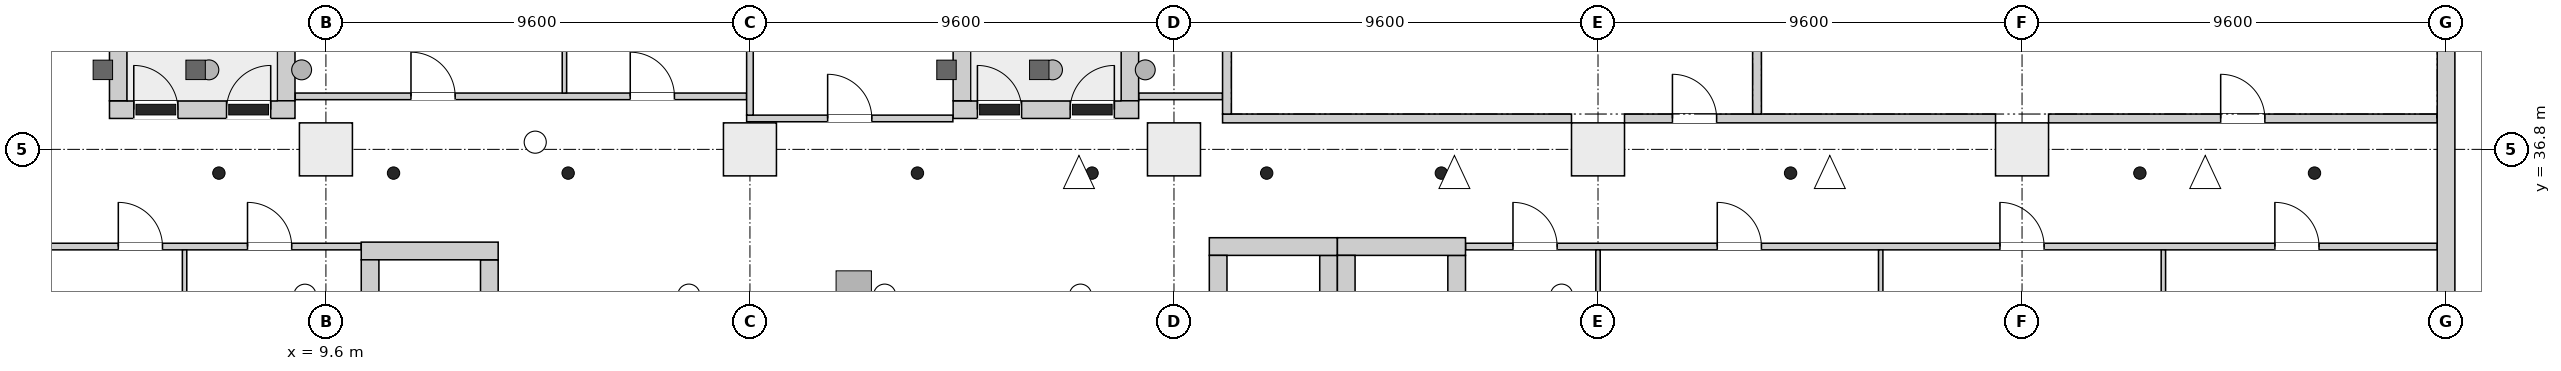
"""IFC4 building model, lengths in metres.
Left out: names, types, materials, properties, quantities, classifications, styles, units other than length and angle.
Written with IfcOpenShell. Run it as: python <this file> out.ifc"""

import sys

from ifc_helpers import new_model, si_unit, direction, frame, frame_2d, origin, origin_2d, place, context, subcontext, project, spatial, rectangle, extrude, element, fill, save


model = new_model("IFC4")
c1 = context("Model", 3, precision=1e-05, world=origin(), true_north=direction((0.0, 1.0)))
c2 = subcontext(c1, "Body", "Model", "MODEL_VIEW")
j1 = project(units=[si_unit("LENGTHUNIT", "METRE"), si_unit("PLANEANGLEUNIT", "RADIAN")], contexts=[c1])
p1 = place(None, origin())
s1 = spatial("IfcSite", under=j1, at=p1, CompositionType="ELEMENT")
p2 = place(p1, origin())
s2 = spatial("IfcBuilding", under=s1, at=p2, CompositionType="ELEMENT")
p3 = place(p2, frame((0.0, 0.0, 21.7)))
s3 = spatial("IfcBuildingStorey", under=s2, at=p3, CompositionType="ELEMENT", Elevation=21.7)
p4 = place(p3, frame((57.6, -0.2, 0.0), z_axis=(0.0, 0.0, 1.0), x_axis=(0.0, 1.0, 0.0)))
e1 = element("IfcWall", 1, at=p4, inside=s3, PredefinedType="SHEAR", context=c2, shape_type="SweptSolid", body=[
    extrude(rectangle(XDim=46.88, YDim=0.4, at=frame_2d((23.44, 0.0))), origin(), (0.0, 0.0, 1.0), 5.0),
])
p5 = place(p3, frame((4.7, 37.7, 0.0), z_axis=(0.0, 0.0, 1.0), x_axis=(1.0, 0.0, 0.0)))
e2 = element("IfcWall", 2, at=p5, inside=s3, PredefinedType="SHEAR", context=c2, shape_type="SweptSolid", body=[
    extrude(rectangle(XDim=4.2, YDim=0.4, at=frame_2d((2.1, 0.0))), origin(), (0.0, 0.0, 1.0), 5.0),
])
p6 = place(p5, frame((0.55, 0.0, 0.0)))
e3 = element("IfcOpeningElement", 3, at=p6, cuts=e2, PredefinedType="OPENING", context=c2, shape_type="SweptSolid", body=[
    extrude(rectangle(XDim=1.0, YDim=2.1, at=frame_2d((0.5, 1.05))), frame((0.0, 0.21, 0.0), z_axis=(0.0, -1.0, 0.0), x_axis=(1.0, 0.0, 0.0)), (0.0, 0.0, 1.0), 0.42),
])
p7 = place(p5, frame((2.65, 0.0, 0.0)))
e4 = element("IfcOpeningElement", 4, at=p7, cuts=e2, PredefinedType="OPENING", context=c2, shape_type="SweptSolid", body=[
    extrude(rectangle(XDim=1.0, YDim=2.1, at=frame_2d((0.5, 1.05))), frame((0.0, 0.21, 0.0), z_axis=(0.0, -1.0, 0.0), x_axis=(1.0, 0.0, 0.0)), (0.0, 0.0, 1.0), 0.42),
])
for number, where, z_axis, x_axis in (
    (5, (4.9, 37.9, 0.0), (0.0, 0.0, 1.0), (0.0, 1.0, 0.0)),
    (6, (8.7, 37.9, 0.0), (0.0, 0.0, 1.0), (0.0, 1.0, 0.0)),
):
    element("IfcWall", number, at=place(p3, frame(where, z_axis=z_axis, x_axis=x_axis)), inside=s3, PredefinedType="SHEAR", context=c2, shape_type="SweptSolid", body=[
        extrude(rectangle(XDim=6.6, YDim=0.4, at=frame_2d((3.3, 0.0))), origin(), (0.0, 0.0, 1.0), 5.0),
    ])
p8 = place(p3, frame((23.8, 37.7, 0.0), z_axis=(0.0, 0.0, 1.0), x_axis=(1.0, 0.0, 0.0)))
e7 = element("IfcWall", 7, at=p8, inside=s3, PredefinedType="SHEAR", context=c2, shape_type="SweptSolid", body=[
    extrude(rectangle(XDim=4.2, YDim=0.4, at=frame_2d((2.1, 0.0))), origin(), (0.0, 0.0, 1.0), 5.0),
])
p9 = place(p8, frame((0.55, 0.0, 0.0)))
e8 = element("IfcOpeningElement", 8, at=p9, cuts=e7, PredefinedType="OPENING", context=c2, shape_type="SweptSolid", body=[
    extrude(rectangle(XDim=1.0, YDim=2.1, at=frame_2d((0.5, 1.05))), frame((0.0, 0.21, 0.0), z_axis=(0.0, -1.0, 0.0), x_axis=(1.0, 0.0, 0.0)), (0.0, 0.0, 1.0), 0.42),
])
p10 = place(p8, frame((2.65, 0.0, 0.0)))
e9 = element("IfcOpeningElement", 9, at=p10, cuts=e7, PredefinedType="OPENING", context=c2, shape_type="SweptSolid", body=[
    extrude(rectangle(XDim=1.0, YDim=2.1, at=frame_2d((0.5, 1.05))), frame((0.0, 0.21, 0.0), z_axis=(0.0, -1.0, 0.0), x_axis=(1.0, 0.0, 0.0)), (0.0, 0.0, 1.0), 0.42),
])
for number, where, z_axis, x_axis in (
    (10, (24.0, 37.9, 0.0), (0.0, 0.0, 1.0), (0.0, 1.0, 0.0)),
    (11, (27.8, 37.9, 0.0), (0.0, 0.0, 1.0), (0.0, 1.0, 0.0)),
):
    element("IfcWall", number, at=place(p3, frame(where, z_axis=z_axis, x_axis=x_axis)), inside=s3, PredefinedType="SHEAR", context=c2, shape_type="SweptSolid", body=[
        extrude(rectangle(XDim=6.6, YDim=0.4, at=frame_2d((3.3, 0.0))), origin(), (0.0, 0.0, 1.0), 5.0),
    ])
p11 = place(p3, frame((10.4, 34.5, 0.0), z_axis=(0.0, 0.0, 1.0), x_axis=(1.0, 0.0, 0.0)))
e12 = element("IfcWall", 12, at=p11, inside=s3, PredefinedType="SHEAR", context=c2, shape_type="SweptSolid", body=[
    extrude(rectangle(XDim=3.1, YDim=0.4, at=frame_2d((1.55, 0.0))), origin(), (0.0, 0.0, 1.0), 5.0),
])
for number, where, z_axis, x_axis in (
    (13, (10.6, 30.9, 0.0), (0.0, 0.0, 1.0), (0.0, 1.0, 0.0)),
    (14, (13.3, 30.9, 0.0), (0.0, 0.0, 1.0), (0.0, 1.0, 0.0)),
):
    element("IfcWall", number, at=place(p3, frame(where, z_axis=z_axis, x_axis=x_axis)), inside=s3, PredefinedType="SHEAR", context=c2, shape_type="SweptSolid", body=[
        extrude(rectangle(XDim=3.4, YDim=0.4, at=frame_2d((1.7, 0.0))), origin(), (0.0, 0.0, 1.0), 5.0),
    ])
p12 = place(p3, frame((29.6, 34.6, 0.0), z_axis=(0.0, 0.0, 1.0), x_axis=(1.0, 0.0, 0.0)))
e15 = element("IfcWall", 15, at=p12, inside=s3, PredefinedType="SHEAR", context=c2, shape_type="SweptSolid", body=[
    extrude(rectangle(XDim=2.9, YDim=0.4, at=frame_2d((1.45, 0.0))), origin(), (0.0, 0.0, 1.0), 5.0),
])
for number, where, z_axis, x_axis in (
    (16, (29.8, 31.4, 0.0), (0.0, 0.0, 1.0), (0.0, 1.0, 0.0)),
    (17, (32.3, 31.4, 0.0), (0.0, 0.0, 1.0), (0.0, 1.0, 0.0)),
):
    element("IfcWall", number, at=place(p3, frame(where, z_axis=z_axis, x_axis=x_axis)), inside=s3, PredefinedType="SHEAR", context=c2, shape_type="SweptSolid", body=[
        extrude(rectangle(XDim=3.0, YDim=0.4, at=frame_2d((1.5, 0.0))), origin(), (0.0, 0.0, 1.0), 5.0),
    ])
p13 = place(p3, frame((32.5, 34.6, 0.0), z_axis=(0.0, 0.0, 1.0), x_axis=(1.0, 0.0, 0.0)))
e18 = element("IfcWall", 18, at=p13, inside=s3, PredefinedType="SHEAR", context=c2, shape_type="SweptSolid", body=[
    extrude(rectangle(XDim=2.9, YDim=0.4, at=frame_2d((1.45, 0.0))), origin(), (0.0, 0.0, 1.0), 5.0),
])
for number, where, z_axis, x_axis in (
    (19, (32.7, 31.4, 0.0), (0.0, 0.0, 1.0), (0.0, 1.0, 0.0)),
    (20, (35.2, 31.4, 0.0), (0.0, 0.0, 1.0), (0.0, 1.0, 0.0)),
):
    element("IfcWall", number, at=place(p3, frame(where, z_axis=z_axis, x_axis=x_axis)), inside=s3, PredefinedType="SHEAR", context=c2, shape_type="SweptSolid", body=[
        extrude(rectangle(XDim=3.0, YDim=0.4, at=frame_2d((1.5, 0.0))), origin(), (0.0, 0.0, 1.0), 5.0),
    ])
for number, where, z_axis, x_axis in (
    (21, (9.6, 36.8, 0.0), (0.0, 0.0, 1.0), (1.0, 0.0, 0.0)),
    (22, (19.2, 36.8, 0.0), (0.0, 0.0, 1.0), (1.0, 0.0, 0.0)),
    (23, (28.8, 36.8, 0.0), (0.0, 0.0, 1.0), (1.0, 0.0, 0.0)),
    (24, (38.4, 36.8, 0.0), (0.0, 0.0, 1.0), (1.0, 0.0, 0.0)),
    (25, (48.0, 36.8, 0.0), (0.0, 0.0, 1.0), (1.0, 0.0, 0.0)),
):
    element("IfcColumn", number, at=place(p3, frame(where, z_axis=z_axis, x_axis=x_axis)), inside=s3, PredefinedType="COLUMN", context=c2, shape_type="SweptSolid", body=[
        extrude(rectangle(XDim=1.2, YDim=1.2, at=origin_2d()), origin(), (0.0, 0.0, 1.0), 5.0),
    ])
p14 = place(p3, frame((2.706, 34.6, 0.0), z_axis=(0.0, 0.0, 1.0), x_axis=(1.0, 0.0, 0.0)))
e26 = element("IfcWall", 26, at=p14, inside=s3, PredefinedType="PARTITIONING", context=c2, shape_type="SweptSolid", body=[
    extrude(rectangle(XDim=7.688, YDim=0.15, at=frame_2d((3.844, 0.0))), origin(), (0.0, 0.0, 1.0), 4.65),
])
p15 = place(p14, frame((2.194, 0.0, 0.0)))
e27 = element("IfcOpeningElement", 27, at=p15, cuts=e26, PredefinedType="OPENING", context=c2, shape_type="SweptSolid", body=[
    extrude(rectangle(XDim=1.0, YDim=2.1, at=frame_2d((0.5, 1.05))), frame((0.0, 0.085, 0.0), z_axis=(0.0, -1.0, 0.0), x_axis=(1.0, 0.0, 0.0)), (0.0, 0.0, 1.0), 0.17),
])
p16 = place(p14, frame((5.119, 0.0, 0.0)))
e28 = element("IfcOpeningElement", 28, at=p16, cuts=e26, PredefinedType="OPENING", context=c2, shape_type="SweptSolid", body=[
    extrude(rectangle(XDim=1.0, YDim=2.1, at=frame_2d((0.5, 1.05))), frame((0.0, 0.085, 0.0), z_axis=(0.0, -1.0, 0.0), x_axis=(1.0, 0.0, 0.0)), (0.0, 0.0, 1.0), 0.17),
])
p17 = place(p3, frame((6.4, 24.875, 0.0), z_axis=(0.0, 0.0, 1.0), x_axis=(0.0, 1.0, 0.0)))
e29 = element("IfcWall", 29, at=p17, inside=s3, PredefinedType="PARTITIONING", context=c2, shape_type="SweptSolid", body=[
    extrude(rectangle(XDim=9.65, YDim=0.1, at=frame_2d((4.825, 0.0))), origin(), (0.0, 0.0, 1.0), 4.65),
])
p18 = place(p3, frame((8.906, 38.0, 0.0), z_axis=(0.0, 0.0, 1.0), x_axis=(1.0, 0.0, 0.0)))
e30 = element("IfcWall", 30, at=p18, inside=s3, PredefinedType="PARTITIONING", context=c2, shape_type="SweptSolid", body=[
    extrude(rectangle(XDim=10.219, YDim=0.15, at=frame_2d((5.109, 0.0))), origin(), (0.0, 0.0, 1.0), 4.65),
])
p19 = place(p18, frame((2.62, 0.0, 0.0)))
e31 = element("IfcOpeningElement", 31, at=p19, cuts=e30, PredefinedType="OPENING", context=c2, shape_type="SweptSolid", body=[
    extrude(rectangle(XDim=1.0, YDim=2.1, at=frame_2d((0.5, 1.05))), frame((0.0, 0.085, 0.0), z_axis=(0.0, -1.0, 0.0), x_axis=(1.0, 0.0, 0.0)), (0.0, 0.0, 1.0), 0.17),
])
p20 = place(p18, frame((7.584, 0.0, 0.0)))
e32 = element("IfcOpeningElement", 32, at=p20, cuts=e30, PredefinedType="OPENING", context=c2, shape_type="SweptSolid", body=[
    extrude(rectangle(XDim=1.0, YDim=2.1, at=frame_2d((0.5, 1.05))), frame((0.0, 0.085, 0.0), z_axis=(0.0, -1.0, 0.0), x_axis=(1.0, 0.0, 0.0)), (0.0, 0.0, 1.0), 0.17),
])
p21 = place(p3, frame((15.0, 38.075, 0.0), z_axis=(0.0, 0.0, 1.0), x_axis=(0.0, 1.0, 0.0)))
e33 = element("IfcWall", 33, at=p21, inside=s3, PredefinedType="PARTITIONING", context=c2, shape_type="SweptSolid", body=[
    extrude(rectangle(XDim=5.65, YDim=0.1, at=frame_2d((2.825, 0.0))), origin(), (0.0, 0.0, 1.0), 4.65),
])
p22 = place(p3, frame((19.125, 37.5, 0.0), z_axis=(0.0, 0.0, 1.0), x_axis=(1.0, 0.0, 0.0)))
e34 = element("IfcWall", 34, at=p22, inside=s3, PredefinedType="PARTITIONING", context=c2, shape_type="SweptSolid", body=[
    extrude(rectangle(XDim=4.669, YDim=0.15, at=frame_2d((2.334, 0.0))), origin(), (0.0, 0.0, 1.0), 4.65),
])
p23 = place(p22, frame((1.834, 0.0, 0.0)))
e35 = element("IfcOpeningElement", 35, at=p23, cuts=e34, PredefinedType="OPENING", context=c2, shape_type="SweptSolid", body=[
    extrude(rectangle(XDim=1.0, YDim=2.1, at=frame_2d((0.5, 1.05))), frame((0.0, 0.085, 0.0), z_axis=(0.0, -1.0, 0.0), x_axis=(1.0, 0.0, 0.0)), (0.0, 0.0, 1.0), 0.17),
])
p24 = place(p3, frame((19.2, 37.575, 0.0), z_axis=(0.0, 0.0, 1.0), x_axis=(0.0, 1.0, 0.0)))
e36 = element("IfcWall", 36, at=p24, inside=s3, PredefinedType="PARTITIONING", context=c2, shape_type="SweptSolid", body=[
    extrude(rectangle(XDim=6.15, YDim=0.15, at=frame_2d((3.075, 0.0))), origin(), (0.0, 0.0, 1.0), 4.25),
])
p25 = place(p3, frame((28.006, 38.0, 0.0), z_axis=(0.0, 0.0, 1.0), x_axis=(1.0, 0.0, 0.0)))
e37 = element("IfcWall", 37, at=p25, inside=s3, PredefinedType="PARTITIONING", context=c2, shape_type="SweptSolid", body=[
    extrude(rectangle(XDim=1.894, YDim=0.15, at=frame_2d((0.947, 0.0))), origin(), (0.0, 0.0, 1.0), 4.65),
])
p26 = place(p3, frame((29.9, 37.5, 0.0), z_axis=(0.0, 0.0, 1.0), x_axis=(1.0, 0.0, 0.0)))
e38 = element("IfcWall", 38, at=p26, inside=s3, PredefinedType="PARTITIONING", context=c2, shape_type="SweptSolid", body=[
    extrude(rectangle(XDim=7.9, YDim=0.2, at=frame_2d((3.95, 0.0))), origin(), (0.0, 0.0, 1.0), 4.65),
])
p27 = place(p3, frame((30.0, 37.6, 0.0), z_axis=(0.0, 0.0, 1.0), x_axis=(0.0, 1.0, 0.0)))
e39 = element("IfcWall", 39, at=p27, inside=s3, PredefinedType="PARTITIONING", context=c2, shape_type="SweptSolid", body=[
    extrude(rectangle(XDim=6.1, YDim=0.2, at=frame_2d((3.05, 0.0))), origin(), (0.0, 0.0, 1.0), 4.65),
])
p28 = place(p3, frame((35.406, 34.6, 0.0), z_axis=(0.0, 0.0, 1.0), x_axis=(1.0, 0.0, 0.0)))
e40 = element("IfcWall", 40, at=p28, inside=s3, PredefinedType="PARTITIONING", context=c2, shape_type="SweptSolid", body=[
    extrude(rectangle(XDim=21.988, YDim=0.15, at=frame_2d((10.994, 0.0))), origin(), (0.0, 0.0, 1.0), 4.65),
])
p29 = place(p28, frame((1.069, 0.0, 0.0)))
e41 = element("IfcOpeningElement", 41, at=p29, cuts=e40, PredefinedType="OPENING", context=c2, shape_type="SweptSolid", body=[
    extrude(rectangle(XDim=1.0, YDim=2.1, at=frame_2d((0.5, 1.05))), frame((0.0, 0.085, 0.0), z_axis=(0.0, -1.0, 0.0), x_axis=(1.0, 0.0, 0.0)), (0.0, 0.0, 1.0), 0.17),
])
p30 = place(p28, frame((5.694, 0.0, 0.0)))
e42 = element("IfcOpeningElement", 42, at=p30, cuts=e40, PredefinedType="OPENING", context=c2, shape_type="SweptSolid", body=[
    extrude(rectangle(XDim=1.0, YDim=2.1, at=frame_2d((0.5, 1.05))), frame((0.0, 0.085, 0.0), z_axis=(0.0, -1.0, 0.0), x_axis=(1.0, 0.0, 0.0)), (0.0, 0.0, 1.0), 0.17),
])
p31 = place(p28, frame((12.094, 0.0, 0.0)))
e43 = element("IfcOpeningElement", 43, at=p31, cuts=e40, PredefinedType="OPENING", context=c2, shape_type="SweptSolid", body=[
    extrude(rectangle(XDim=1.0, YDim=2.1, at=frame_2d((0.5, 1.05))), frame((0.0, 0.085, 0.0), z_axis=(0.0, -1.0, 0.0), x_axis=(1.0, 0.0, 0.0)), (0.0, 0.0, 1.0), 0.17),
])
p32 = place(p28, frame((18.318, 0.0, 0.0)))
e44 = element("IfcOpeningElement", 44, at=p32, cuts=e40, PredefinedType="OPENING", context=c2, shape_type="SweptSolid", body=[
    extrude(rectangle(XDim=1.0, YDim=2.1, at=frame_2d((0.5, 1.05))), frame((0.0, 0.085, 0.0), z_axis=(0.0, -1.0, 0.0), x_axis=(1.0, 0.0, 0.0)), (0.0, 0.0, 1.0), 0.17),
])
p33 = place(p3, frame((38.4, 28.2, 0.0), z_axis=(0.0, 0.0, 1.0), x_axis=(0.0, 1.0, 0.0)))
e45 = element("IfcWall", 45, at=p33, inside=s3, PredefinedType="PARTITIONING", context=c2, shape_type="SweptSolid", body=[
    extrude(rectangle(XDim=6.325, YDim=0.1, at=frame_2d((3.163, 0.0))), origin(), (0.0, 0.0, 1.0), 4.25),
])
p34 = place(p3, frame((39.0, 37.5, 0.0), z_axis=(0.0, 0.0, 1.0), x_axis=(1.0, 0.0, 0.0)))
e46 = element("IfcWall", 46, at=p34, inside=s3, PredefinedType="PARTITIONING", context=c2, shape_type="SweptSolid", body=[
    extrude(rectangle(XDim=8.4, YDim=0.2, at=frame_2d((4.2, 0.0))), origin(), (0.0, 0.0, 1.0), 4.65),
])
p35 = place(p34, frame((1.085, 0.0, 0.0)))
e47 = element("IfcOpeningElement", 47, at=p35, cuts=e46, PredefinedType="OPENING", context=c2, shape_type="SweptSolid", body=[
    extrude(rectangle(XDim=1.0, YDim=2.1, at=frame_2d((0.5, 1.05))), frame((0.0, 0.11, 0.0), z_axis=(0.0, -1.0, 0.0), x_axis=(1.0, 0.0, 0.0)), (0.0, 0.0, 1.0), 0.22),
])
p36 = place(p3, frame((42.0, 37.6, 0.0), z_axis=(0.0, 0.0, 1.0), x_axis=(0.0, 1.0, 0.0)))
e48 = element("IfcWall", 48, at=p36, inside=s3, PredefinedType="PARTITIONING", context=c2, shape_type="SweptSolid", body=[
    extrude(rectangle(XDim=6.1, YDim=0.2, at=frame_2d((3.05, 0.0))), origin(), (0.0, 0.0, 1.0), 4.65),
])
p37 = place(p3, frame((44.8, 27.05, 0.0), z_axis=(0.0, 0.0, 1.0), x_axis=(0.0, 1.0, 0.0)))
e49 = element("IfcWall", 49, at=p37, inside=s3, PredefinedType="PARTITIONING", context=c2, shape_type="SweptSolid", body=[
    extrude(rectangle(XDim=7.475, YDim=0.1, at=frame_2d((3.737, 0.0))), origin(), (0.0, 0.0, 1.0), 4.65),
])
p38 = place(p3, frame((48.6, 37.5, 0.0), z_axis=(0.0, 0.0, 1.0), x_axis=(1.0, 0.0, 0.0)))
e50 = element("IfcWall", 50, at=p38, inside=s3, PredefinedType="PARTITIONING", context=c2, shape_type="SweptSolid", body=[
    extrude(rectangle(XDim=8.794, YDim=0.2, at=frame_2d((4.397, 0.0))), origin(), (0.0, 0.0, 1.0), 4.65),
])
p39 = place(p38, frame((3.897, 0.0, 0.0)))
e51 = element("IfcOpeningElement", 51, at=p39, cuts=e50, PredefinedType="OPENING", context=c2, shape_type="SweptSolid", body=[
    extrude(rectangle(XDim=1.0, YDim=2.1, at=frame_2d((0.5, 1.05))), frame((0.0, 0.11, 0.0), z_axis=(0.0, -1.0, 0.0), x_axis=(1.0, 0.0, 0.0)), (0.0, 0.0, 1.0), 0.22),
])
p40 = place(p3, frame((51.2, 27.05, 0.0), z_axis=(0.0, 0.0, 1.0), x_axis=(0.0, 1.0, 0.0)))
e52 = element("IfcWall", 52, at=p40, inside=s3, PredefinedType="PARTITIONING", context=c2, shape_type="SweptSolid", body=[
    extrude(rectangle(XDim=7.475, YDim=0.1, at=frame_2d((3.737, 0.0))), origin(), (0.0, 0.0, 1.0), 4.65),
])
p41 = place(p6, origin())
e53 = element("IfcDoor", 53, at=p41, inside=s3, OperationType="SINGLE_SWING_RIGHT", PredefinedType="DOOR", context=c2, shape_type="SweptSolid", body=[
    extrude(rectangle(XDim=1.0, YDim=2.1, at=frame_2d((0.5, 1.05))), frame((0.0, 0.025, 0.0), z_axis=(0.0, -1.0, 0.0), x_axis=(1.0, 0.0, 0.0)), (0.0, 0.0, 1.0), 0.05),
])
fill(e3, e53)
p42 = place(p7, origin())
e54 = element("IfcDoor", 54, at=p42, inside=s3, OperationType="SINGLE_SWING_LEFT", PredefinedType="DOOR", context=c2, shape_type="SweptSolid", body=[
    extrude(rectangle(XDim=1.0, YDim=2.1, at=frame_2d((0.5, 1.05))), frame((0.0, 0.025, 0.0), z_axis=(0.0, -1.0, 0.0), x_axis=(1.0, 0.0, 0.0)), (0.0, 0.0, 1.0), 0.05),
])
fill(e4, e54)
p43 = place(p9, origin())
e55 = element("IfcDoor", 55, at=p43, inside=s3, OperationType="SINGLE_SWING_RIGHT", PredefinedType="DOOR", context=c2, shape_type="SweptSolid", body=[
    extrude(rectangle(XDim=1.0, YDim=2.1, at=frame_2d((0.5, 1.05))), frame((0.0, 0.025, 0.0), z_axis=(0.0, -1.0, 0.0), x_axis=(1.0, 0.0, 0.0)), (0.0, 0.0, 1.0), 0.05),
])
fill(e8, e55)
p44 = place(p10, origin())
e56 = element("IfcDoor", 56, at=p44, inside=s3, OperationType="SINGLE_SWING_LEFT", PredefinedType="DOOR", context=c2, shape_type="SweptSolid", body=[
    extrude(rectangle(XDim=1.0, YDim=2.1, at=frame_2d((0.5, 1.05))), frame((0.0, 0.025, 0.0), z_axis=(0.0, -1.0, 0.0), x_axis=(1.0, 0.0, 0.0)), (0.0, 0.0, 1.0), 0.05),
])
fill(e9, e56)
p45 = place(p15, origin())
e57 = element("IfcDoor", 57, at=p45, inside=s3, OperationType="SINGLE_SWING_RIGHT", PredefinedType="DOOR", context=c2, shape_type="SweptSolid", body=[
    extrude(rectangle(XDim=1.0, YDim=2.1, at=frame_2d((0.5, 1.05))), frame((0.0, 0.025, 0.0), z_axis=(0.0, -1.0, 0.0), x_axis=(1.0, 0.0, 0.0)), (0.0, 0.0, 1.0), 0.05),
])
fill(e27, e57)
p46 = place(p16, origin())
e58 = element("IfcDoor", 58, at=p46, inside=s3, OperationType="SINGLE_SWING_LEFT", PredefinedType="DOOR", context=c2, shape_type="SweptSolid", body=[
    extrude(rectangle(XDim=1.0, YDim=2.1, at=frame_2d((0.5, 1.05))), frame((0.0, 0.025, 0.0), z_axis=(0.0, -1.0, 0.0), x_axis=(1.0, 0.0, 0.0)), (0.0, 0.0, 1.0), 0.05),
])
fill(e28, e58)
p47 = place(p29, origin())
e59 = element("IfcDoor", 59, at=p47, inside=s3, OperationType="SINGLE_SWING_RIGHT", PredefinedType="DOOR", context=c2, shape_type="SweptSolid", body=[
    extrude(rectangle(XDim=1.0, YDim=2.1, at=frame_2d((0.5, 1.05))), frame((0.0, 0.025, 0.0), z_axis=(0.0, -1.0, 0.0), x_axis=(1.0, 0.0, 0.0)), (0.0, 0.0, 1.0), 0.05),
])
fill(e41, e59)
p48 = place(p30, origin())
e60 = element("IfcDoor", 60, at=p48, inside=s3, OperationType="SINGLE_SWING_RIGHT", PredefinedType="DOOR", context=c2, shape_type="SweptSolid", body=[
    extrude(rectangle(XDim=1.0, YDim=2.1, at=frame_2d((0.5, 1.05))), frame((0.0, 0.025, 0.0), z_axis=(0.0, -1.0, 0.0), x_axis=(1.0, 0.0, 0.0)), (0.0, 0.0, 1.0), 0.05),
])
fill(e42, e60)
p49 = place(p31, origin())
e61 = element("IfcDoor", 61, at=p49, inside=s3, OperationType="SINGLE_SWING_LEFT", PredefinedType="DOOR", context=c2, shape_type="SweptSolid", body=[
    extrude(rectangle(XDim=1.0, YDim=2.1, at=frame_2d((0.5, 1.05))), frame((0.0, 0.025, 0.0), z_axis=(0.0, -1.0, 0.0), x_axis=(1.0, 0.0, 0.0)), (0.0, 0.0, 1.0), 0.05),
])
fill(e43, e61)
p50 = place(p32, origin())
e62 = element("IfcDoor", 62, at=p50, inside=s3, OperationType="SINGLE_SWING_LEFT", PredefinedType="DOOR", context=c2, shape_type="SweptSolid", body=[
    extrude(rectangle(XDim=1.0, YDim=2.1, at=frame_2d((0.5, 1.05))), frame((0.0, 0.025, 0.0), z_axis=(0.0, -1.0, 0.0), x_axis=(1.0, 0.0, 0.0)), (0.0, 0.0, 1.0), 0.05),
])
fill(e44, e62)
p51 = place(p35, origin())
e63 = element("IfcDoor", 63, at=p51, inside=s3, OperationType="SINGLE_SWING_RIGHT", PredefinedType="DOOR", context=c2, shape_type="SweptSolid", body=[
    extrude(rectangle(XDim=1.0, YDim=2.1, at=frame_2d((0.5, 1.05))), frame((0.0, 0.025, 0.0), z_axis=(0.0, -1.0, 0.0), x_axis=(1.0, 0.0, 0.0)), (0.0, 0.0, 1.0), 0.05),
])
fill(e47, e63)
p52 = place(p39, origin())
e64 = element("IfcDoor", 64, at=p52, inside=s3, OperationType="SINGLE_SWING_LEFT", PredefinedType="DOOR", context=c2, shape_type="SweptSolid", body=[
    extrude(rectangle(XDim=1.0, YDim=2.1, at=frame_2d((0.5, 1.05))), frame((0.0, 0.025, 0.0), z_axis=(0.0, -1.0, 0.0), x_axis=(1.0, 0.0, 0.0)), (0.0, 0.0, 1.0), 0.05),
])
fill(e51, e64)
p53 = place(p23, origin())
e65 = element("IfcDoor", 65, at=p53, inside=s3, OperationType="SINGLE_SWING_LEFT", PredefinedType="DOOR", context=c2, shape_type="SweptSolid", body=[
    extrude(rectangle(XDim=1.0, YDim=2.1, at=frame_2d((0.5, 1.05))), frame((0.0, 0.025, 0.0), z_axis=(0.0, -1.0, 0.0), x_axis=(1.0, 0.0, 0.0)), (0.0, 0.0, 1.0), 0.05),
])
fill(e35, e65)
p54 = place(p19, origin())
e66 = element("IfcDoor", 66, at=p54, inside=s3, OperationType="SINGLE_SWING_LEFT", PredefinedType="DOOR", context=c2, shape_type="SweptSolid", body=[
    extrude(rectangle(XDim=1.0, YDim=2.1, at=frame_2d((0.5, 1.05))), frame((0.0, 0.025, 0.0), z_axis=(0.0, -1.0, 0.0), x_axis=(1.0, 0.0, 0.0)), (0.0, 0.0, 1.0), 0.05),
])
fill(e31, e66)
p55 = place(p20, origin())
e67 = element("IfcDoor", 67, at=p55, inside=s3, OperationType="SINGLE_SWING_RIGHT", PredefinedType="DOOR", context=c2, shape_type="SweptSolid", body=[
    extrude(rectangle(XDim=1.0, YDim=2.1, at=frame_2d((0.5, 1.05))), frame((0.0, 0.025, 0.0), z_axis=(0.0, -1.0, 0.0), x_axis=(1.0, 0.0, 0.0)), (0.0, 0.0, 1.0), 0.05),
])
fill(e32, e67)
save(model, sys.argv[1])
